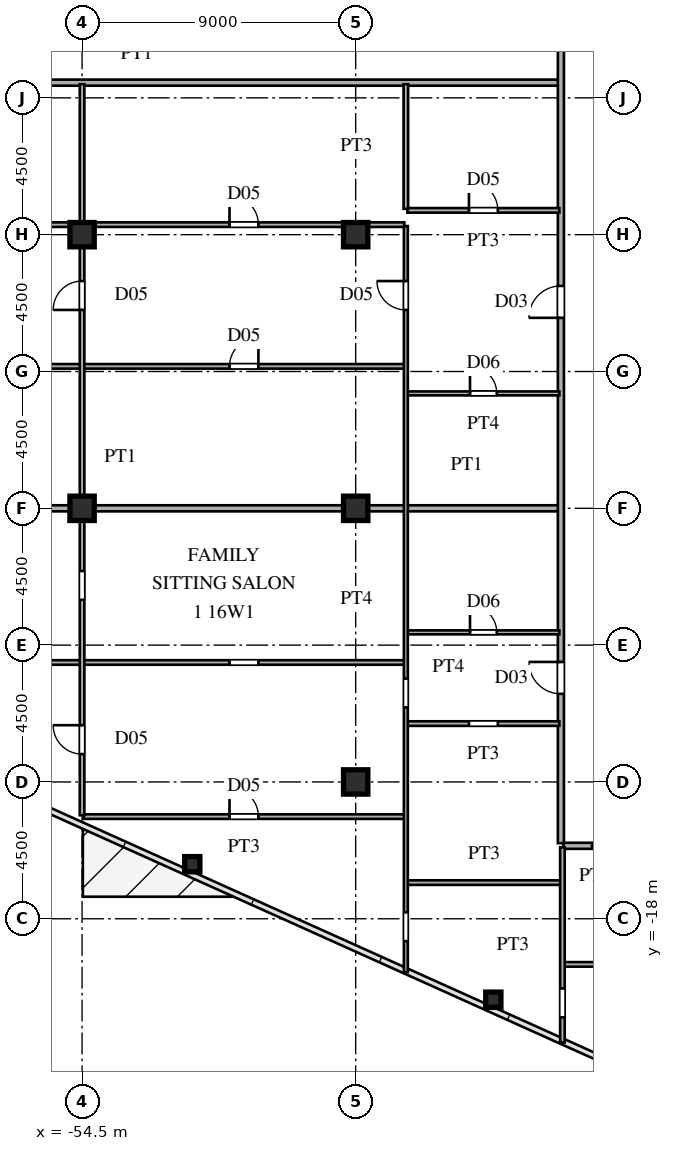
"""IFC4 building model, lengths in metres.
Left out: names, types, materials, properties, quantities, classifications, styles, units other than length and angle.
Written with IfcOpenShell. Run it as: python <this file> out.ifc"""

import sys

from ifc_helpers import new_model, si_unit, direction, frame, frame_2d, origin, origin_2d, place, context, subcontext, project, spatial, rectangle, hollow_rectangle, i_section, extrude, source, transform, mapped, element, fill, save


model = new_model("IFC4")
c1 = context("Model", 3, precision=1e-05, world=origin(), true_north=direction((0.0, 1.0)))
c2 = subcontext(c1, "Body", "Model", "MODEL_VIEW")
j1 = project(units=[si_unit("LENGTHUNIT", "METRE"), si_unit("PLANEANGLEUNIT", "RADIAN")], contexts=[c1])
p1 = place(None, origin())
s1 = spatial("IfcSite", under=j1, at=p1, CompositionType="ELEMENT")
p2 = place(p1, origin())
s2 = spatial("IfcBuilding", under=s1, at=p2, CompositionType="ELEMENT")
p3 = place(p2, frame((0.0, 0.0, 62.1)))
s3 = spatial("IfcBuildingStorey", under=s2, at=p3, CompositionType="ELEMENT", Elevation=62.1)
m1 = source(origin(), c2, "Body", "SweptSolid", [
    extrude(i_section(OverallWidth=0.8, OverallDepth=0.8, WebThickness=0.032, FlangeThickness=0.05, at=origin_2d()), origin(), (0.0, 0.0, 1.0), 3.6),
])
for number, where, z_axis, x_axis in (
    (1, (-45.5, -13.5, 0.0), (0.0, 0.0, 1.0), (1.0, 0.0, 0.0)),
    (2, (-45.5, -4.5, 0.0), (0.0, 0.0, 1.0), (1.0, 0.0, 0.0)),
    (3, (-45.5, 4.5, 0.0), (0.0, 0.0, 1.0), (1.0, 0.0, 0.0)),
    (4, (-54.5, -4.5, 0.0), (0.0, 0.0, 1.0), (1.0, 0.0, 0.0)),
    (5, (-54.5, 4.5, 0.0), (0.0, 0.0, 1.0), (1.0, 0.0, 0.0)),
):
    element("IfcColumn", number, at=place(p3, frame(where, z_axis=z_axis, x_axis=x_axis)), inside=s3, PredefinedType="COLUMN", context=c2, shape_type="MappedRepresentation", body=[
        mapped(m1, transform((0.0, 0.0, 0.0), scale=1.0)),
    ])
m2 = source(origin(), c2, "Body", "SweptSolid", [
    extrude(hollow_rectangle(XDim=0.5, YDim=0.5, WallThickness=0.02, at=origin_2d()), origin(), (0.0, 0.0, 1.0), 3.6),
])
for number, where, z_axis, x_axis in (
    (6, (-40.973, -20.661, 0.0), (0.0, 0.0, 1.0), (1.0, 0.0, 0.0)),
    (7, (-50.875, -16.205, 0.0), (0.0, 0.0, 1.0), (1.0, 0.0, 0.0)),
):
    element("IfcColumn", number, at=place(p3, frame(where, z_axis=z_axis, x_axis=x_axis)), inside=s3, PredefinedType="COLUMN", context=c2, shape_type="MappedRepresentation", body=[
        mapped(m2, transform((0.0, 0.0, 0.0), scale=1.0)),
    ])
p4 = place(p3, frame((-38.65, -19.5, 0.0), z_axis=(0.0, 0.0, 1.0), x_axis=(1.0, 0.0, 0.0)))
e8 = element("IfcWall", 8, at=p4, inside=s3, PredefinedType="PARTITIONING", context=c2, shape_type="SweptSolid", body=[
    extrude(rectangle(XDim=11.185, YDim=0.15, at=frame_2d((5.592, 0.0))), origin(), (0.0, 0.0, 1.0), 3.38),
])
p5 = place(p4, frame((5.075, 0.0, 0.0)))
e9 = element("IfcOpeningElement", 9, at=p5, cuts=e8, PredefinedType="OPENING", context=c2, shape_type="SweptSolid", body=[
    extrude(rectangle(XDim=0.95, YDim=2.15, at=frame_2d((0.475, 1.075))), frame((0.0, 0.085, 0.0), z_axis=(0.0, -1.0, 0.0), x_axis=(1.0, 0.0, 0.0)), (0.0, 0.0, 1.0), 0.17),
])
p6 = place(p3, frame((-43.8, -16.81, 0.0), z_axis=(0.0, 0.0, 1.0), x_axis=(1.0, 0.0, 0.0)))
e10 = element("IfcWall", 10, at=p6, inside=s3, PredefinedType="PARTITIONING", context=c2, shape_type="SweptSolid", body=[
    extrude(rectangle(XDim=5.05, YDim=0.15, at=frame_2d((2.525, 0.0))), origin(), (0.0, 0.0, 1.0), 3.38),
])
p7 = place(p3, frame((-38.665, -15.6, 0.0), z_axis=(0.0, 0.0, 1.0), x_axis=(1.0, 0.0, 0.0)))
e11 = element("IfcWall", 11, at=p7, inside=s3, PredefinedType="PARTITIONING", context=c2, shape_type="SweptSolid", body=[
    extrude(rectangle(XDim=2.08, YDim=0.2, at=frame_2d((1.04, 0.0))), origin(), (0.0, 0.0, 1.0), 3.38),
])
p8 = place(p3, frame((-54.45, -14.64, 0.0), z_axis=(0.0, 0.0, 1.0), x_axis=(1.0, 0.0, 0.0)))
e12 = element("IfcWall", 12, at=p8, inside=s3, PredefinedType="PARTITIONING", context=c2, shape_type="SweptSolid", body=[
    extrude(rectangle(XDim=10.55, YDim=0.15, at=frame_2d((5.275, 0.0))), origin(), (0.0, 0.0, 1.0), 3.38),
])
p9 = place(p8, frame((4.8, 0.0, 0.0)))
e13 = element("IfcOpeningElement", 13, at=p9, cuts=e12, PredefinedType="OPENING", context=c2, shape_type="SweptSolid", body=[
    extrude(rectangle(XDim=0.95, YDim=2.15, at=frame_2d((0.475, 1.075))), frame((0.0, 0.085, 0.0), z_axis=(0.0, -1.0, 0.0), x_axis=(1.0, 0.0, 0.0)), (0.0, 0.0, 1.0), 0.17),
])
p10 = place(p3, frame((-43.8, -11.58, 0.0), z_axis=(0.0, 0.0, 1.0), x_axis=(1.0, 0.0, 0.0)))
e14 = element("IfcWall", 14, at=p10, inside=s3, PredefinedType="PARTITIONING", context=c2, shape_type="SweptSolid", body=[
    extrude(rectangle(XDim=5.0, YDim=0.15, at=frame_2d((2.5, 0.0))), origin(), (0.0, 0.0, 1.0), 3.38),
])
p11 = place(p10, frame((2.025, 0.0, 0.0)))
e15 = element("IfcOpeningElement", 15, at=p11, cuts=e14, PredefinedType="OPENING", context=c2, shape_type="SweptSolid", body=[
    extrude(rectangle(XDim=0.95, YDim=2.15, at=frame_2d((0.475, 1.075))), frame((0.0, 0.085, 0.0), z_axis=(0.0, -1.0, 0.0), x_axis=(1.0, 0.0, 0.0)), (0.0, 0.0, 1.0), 0.17),
])
p12 = place(p3, frame((-66.429, -9.57, 0.0), z_axis=(0.0, 0.0, 1.0), x_axis=(1.0, 0.0, 0.0)))
e16 = element("IfcWall", 16, at=p12, inside=s3, PredefinedType="PARTITIONING", context=c2, shape_type="SweptSolid", body=[
    extrude(rectangle(XDim=22.529, YDim=0.15, at=frame_2d((11.265, 0.0))), origin(), (0.0, 0.0, 1.0), 3.38),
])
p13 = place(p12, frame((16.779, 0.0, 0.0)))
e17 = element("IfcOpeningElement", 17, at=p13, cuts=e16, PredefinedType="OPENING", context=c2, shape_type="SweptSolid", body=[
    extrude(rectangle(XDim=0.95, YDim=2.15, at=frame_2d((0.475, 1.075))), frame((0.0, 0.085, 0.0), z_axis=(0.0, -1.0, 0.0), x_axis=(1.0, 0.0, 0.0)), (0.0, 0.0, 1.0), 0.17),
])
p14 = place(p3, frame((-43.8, -8.58, 0.0), z_axis=(0.0, 0.0, 1.0), x_axis=(1.0, 0.0, 0.0)))
e18 = element("IfcWall", 18, at=p14, inside=s3, PredefinedType="PARTITIONING", context=c2, shape_type="SweptSolid", body=[
    extrude(rectangle(XDim=5.0, YDim=0.13, at=frame_2d((2.5, 0.0))), origin(), (0.0, 0.0, 1.0), 3.38),
])
p15 = place(p14, frame((2.06, 0.0, 0.0)))
e19 = element("IfcOpeningElement", 19, at=p15, cuts=e18, PredefinedType="OPENING", context=c2, shape_type="SweptSolid", body=[
    extrude(rectangle(XDim=0.88, YDim=2.1, at=frame_2d((0.44, 1.05))), frame((0.0, 0.075, 0.0), z_axis=(0.0, -1.0, 0.0), x_axis=(1.0, 0.0, 0.0)), (0.0, 0.0, 1.0), 0.15),
])
p16 = place(p3, frame((-71.005, -4.5, 0.0), z_axis=(0.0, 0.0, 1.0), x_axis=(1.0, 0.0, 0.0)))
e20 = element("IfcWall", 20, at=p16, inside=s3, PredefinedType="PARTITIONING", context=c2, shape_type="SweptSolid", body=[
    extrude(rectangle(XDim=16.485, YDim=0.2, at=frame_2d((8.242, 0.0))), origin(), (0.0, 0.0, 1.0), 3.38),
])
p17 = place(p3, frame((-54.52, -4.5, 0.0), z_axis=(0.0, 0.0, 1.0), x_axis=(1.0, 0.0, 0.0)))
e21 = element("IfcWall", 21, at=p17, inside=s3, PredefinedType="PARTITIONING", context=c2, shape_type="SweptSolid", body=[
    extrude(rectangle(XDim=15.69, YDim=0.2, at=frame_2d((7.845, 0.0))), origin(), (0.0, 0.0, 1.0), 2.68),
])
p18 = place(p3, frame((-43.8, -0.72, 0.0), z_axis=(0.0, 0.0, 1.0), x_axis=(1.0, 0.0, 0.0)))
e22 = element("IfcWall", 22, at=p18, inside=s3, PredefinedType="PARTITIONING", context=c2, shape_type="SweptSolid", body=[
    extrude(rectangle(XDim=5.0, YDim=0.13, at=frame_2d((2.5, 0.0))), origin(), (0.0, 0.0, 1.0), 3.38),
])
p19 = place(p18, frame((2.06, 0.0, 0.0)))
e23 = element("IfcOpeningElement", 23, at=p19, cuts=e22, PredefinedType="OPENING", context=c2, shape_type="SweptSolid", body=[
    extrude(rectangle(XDim=0.88, YDim=2.1, at=frame_2d((0.44, 1.05))), frame((0.0, 0.075, 0.0), z_axis=(0.0, -1.0, 0.0), x_axis=(1.0, 0.0, 0.0)), (0.0, 0.0, 1.0), 0.15),
])
p20 = place(p3, frame((-71.035, 0.17, 0.0), z_axis=(0.0, 0.0, 1.0), x_axis=(1.0, 0.0, 0.0)))
e24 = element("IfcWall", 24, at=p20, inside=s3, PredefinedType="PARTITIONING", context=c2, shape_type="SweptSolid", body=[
    extrude(rectangle(XDim=27.135, YDim=0.15, at=frame_2d((13.567, 0.0))), origin(), (0.0, 0.0, 1.0), 3.38),
])
p21 = place(p20, frame((21.385, 0.0, 0.0)))
e25 = element("IfcOpeningElement", 25, at=p21, cuts=e24, PredefinedType="OPENING", context=c2, shape_type="SweptSolid", body=[
    extrude(rectangle(XDim=0.95, YDim=2.15, at=frame_2d((0.475, 1.075))), frame((0.0, 0.085, 0.0), z_axis=(0.0, -1.0, 0.0), x_axis=(1.0, 0.0, 0.0)), (0.0, 0.0, 1.0), 0.17),
])
p22 = place(p20, frame((13.21, 0.0, 0.0)))
e26 = element("IfcOpeningElement", 26, at=p22, cuts=e24, PredefinedType="OPENING", context=c2, shape_type="SweptSolid", body=[
    extrude(rectangle(XDim=0.95, YDim=2.15, at=frame_2d((0.475, 1.075))), frame((0.0, 0.085, 0.0), z_axis=(0.0, -1.0, 0.0), x_axis=(1.0, 0.0, 0.0)), (0.0, 0.0, 1.0), 0.17),
])
p23 = place(p3, frame((-71.035, 4.83, 0.0), z_axis=(0.0, 0.0, 1.0), x_axis=(1.0, 0.0, 0.0)))
e27 = element("IfcWall", 27, at=p23, inside=s3, PredefinedType="PARTITIONING", context=c2, shape_type="SweptSolid", body=[
    extrude(rectangle(XDim=27.135, YDim=0.15, at=frame_2d((13.567, 0.0))), origin(), (0.0, 0.0, 1.0), 3.38),
])
p24 = place(p23, frame((21.385, 0.0, 0.0)))
e28 = element("IfcOpeningElement", 28, at=p24, cuts=e27, PredefinedType="OPENING", context=c2, shape_type="SweptSolid", body=[
    extrude(rectangle(XDim=0.95, YDim=2.15, at=frame_2d((0.475, 1.075))), frame((0.0, 0.085, 0.0), z_axis=(0.0, -1.0, 0.0), x_axis=(1.0, 0.0, 0.0)), (0.0, 0.0, 1.0), 0.17),
])
p25 = place(p23, frame((13.21, 0.0, 0.0)))
e29 = element("IfcOpeningElement", 29, at=p25, cuts=e27, PredefinedType="OPENING", context=c2, shape_type="SweptSolid", body=[
    extrude(rectangle(XDim=0.95, YDim=2.15, at=frame_2d((0.475, 1.075))), frame((0.0, 0.085, 0.0), z_axis=(0.0, -1.0, 0.0), x_axis=(1.0, 0.0, 0.0)), (0.0, 0.0, 1.0), 0.17),
])
p26 = place(p3, frame((-43.8, 5.3, 0.0), z_axis=(0.0, 0.0, 1.0), x_axis=(1.0, 0.0, 0.0)))
e30 = element("IfcWall", 30, at=p26, inside=s3, PredefinedType="PARTITIONING", context=c2, shape_type="SweptSolid", body=[
    extrude(rectangle(XDim=5.0, YDim=0.15, at=frame_2d((2.5, 0.0))), origin(), (0.0, 0.0, 1.0), 3.38),
])
p27 = place(p26, frame((2.025, 0.0, 0.0)))
e31 = element("IfcOpeningElement", 31, at=p27, cuts=e30, PredefinedType="OPENING", context=c2, shape_type="SweptSolid", body=[
    extrude(rectangle(XDim=0.95, YDim=2.15, at=frame_2d((0.475, 1.075))), frame((0.0, 0.085, 0.0), z_axis=(0.0, -1.0, 0.0), x_axis=(1.0, 0.0, 0.0)), (0.0, 0.0, 1.0), 0.17),
])
p28 = place(p3, frame((-66.568, 9.5, 0.0), z_axis=(0.0, 0.0, 1.0), x_axis=(1.0, 0.0, 0.0)))
e32 = element("IfcWall", 32, at=p28, inside=s3, PredefinedType="PARTITIONING", context=c2, shape_type="SweptSolid", body=[
    extrude(rectangle(XDim=27.738, YDim=0.2, at=frame_2d((13.869, 0.0))), origin(), (0.0, 0.0, 1.0), 3.38),
])
p29 = place(p3, frame((-54.5, -14.595, 0.0), z_axis=(0.0, 0.0, 1.0), x_axis=(0.0, 1.0, 0.0)))
e33 = element("IfcWall", 33, at=p29, inside=s3, PredefinedType="PARTITIONING", context=c2, shape_type="SweptSolid", body=[
    extrude(rectangle(XDim=24.045, YDim=0.15, at=frame_2d((12.022, 0.0))), origin(), (0.0, 0.0, 1.0), 2.68),
])
p30 = place(p29, frame((2.011, 0.0, 0.0)))
e34 = element("IfcOpeningElement", 34, at=p30, cuts=e33, PredefinedType="OPENING", context=c2, shape_type="SweptSolid", body=[
    extrude(rectangle(XDim=0.95, YDim=2.15, at=frame_2d((0.475, 1.075))), frame((0.0, 0.085, 0.0), z_axis=(0.0, -1.0, 0.0), x_axis=(1.0, 0.0, 0.0)), (0.0, 0.0, 1.0), 0.17),
])
p31 = place(p29, frame((7.084, 0.0, 0.0)))
e35 = element("IfcOpeningElement", 35, at=p31, cuts=e33, PredefinedType="OPENING", context=c2, shape_type="SweptSolid", body=[
    extrude(rectangle(XDim=0.95, YDim=2.15, at=frame_2d((0.475, 1.075))), frame((0.0, 0.085, 0.0), z_axis=(0.0, -1.0, 0.0), x_axis=(1.0, 0.0, 0.0)), (0.0, 0.0, 1.0), 0.17),
])
p32 = place(p29, frame((16.62, 0.0, 0.0)))
e36 = element("IfcOpeningElement", 36, at=p32, cuts=e33, PredefinedType="OPENING", context=c2, shape_type="SweptSolid", body=[
    extrude(rectangle(XDim=0.95, YDim=2.15, at=frame_2d((0.475, 1.075))), frame((0.0, 0.085, 0.0), z_axis=(0.0, -1.0, 0.0), x_axis=(1.0, 0.0, 0.0)), (0.0, 0.0, 1.0), 0.17),
])
p33 = place(p3, frame((-43.85, -19.753, 0.0), z_axis=(0.0, 0.0, 1.0), x_axis=(0.0, 1.0, 0.0)))
e37 = element("IfcWall", 37, at=p33, inside=s3, PredefinedType="PARTITIONING", context=c2, shape_type="SweptSolid", body=[
    extrude(rectangle(XDim=24.536, YDim=0.13, at=frame_2d((12.268, 0.0))), origin(), (0.0, 0.0, 1.0), 3.38),
])
p34 = place(p33, frame((8.703, 0.0, 0.0)))
e38 = element("IfcOpeningElement", 38, at=p34, cuts=e37, PredefinedType="OPENING", context=c2, shape_type="SweptSolid", body=[
    extrude(rectangle(XDim=0.95, YDim=2.15, at=frame_2d((0.475, 1.075))), frame((0.0, 0.075, 0.0), z_axis=(0.0, -1.0, 0.0), x_axis=(1.0, 0.0, 0.0)), (0.0, 0.0, 1.0), 0.15),
])
p35 = place(p33, frame((1.016, 0.0, 0.0)))
e39 = element("IfcOpeningElement", 39, at=p35, cuts=e37, PredefinedType="OPENING", context=c2, shape_type="SweptSolid", body=[
    extrude(rectangle(XDim=0.95, YDim=2.15, at=frame_2d((0.475, 1.075))), frame((0.0, 0.075, 0.0), z_axis=(0.0, -1.0, 0.0), x_axis=(1.0, 0.0, 0.0)), (0.0, 0.0, 1.0), 0.15),
])
p36 = place(p33, frame((21.778, 0.0, 0.0)))
e40 = element("IfcOpeningElement", 40, at=p36, cuts=e37, PredefinedType="OPENING", context=c2, shape_type="SweptSolid", body=[
    extrude(rectangle(XDim=0.95, YDim=2.15, at=frame_2d((0.475, 1.075))), frame((0.0, 0.075, 0.0), z_axis=(0.0, -1.0, 0.0), x_axis=(1.0, 0.0, 0.0)), (0.0, 0.0, 1.0), 0.15),
])
p37 = place(p3, frame((-43.85, 5.352, 0.0), z_axis=(0.0, 0.0, 1.0), x_axis=(0.0, 1.0, 0.0)))
e41 = element("IfcWall", 41, at=p37, inside=s3, PredefinedType="PARTITIONING", context=c2, shape_type="SweptSolid", body=[
    extrude(rectangle(XDim=4.098, YDim=0.15, at=frame_2d((2.049, 0.0))), origin(), (0.0, 0.0, 1.0), 3.38),
])
p38 = place(p3, frame((-38.75, -15.515, 0.0), z_axis=(0.0, 0.0, 1.0), x_axis=(0.0, 1.0, 0.0)))
e42 = element("IfcWall", 42, at=p38, inside=s3, PredefinedType="PARTITIONING", context=c2, shape_type="SweptSolid", body=[
    extrude(rectangle(XDim=31.03, YDim=0.2, at=frame_2d((15.515, 0.0))), origin(), (0.0, 0.0, 1.0), 3.38),
])
p39 = place(p38, frame((4.913, 0.0, 0.0)))
e43 = element("IfcOpeningElement", 43, at=p39, cuts=e42, PredefinedType="OPENING", context=c2, shape_type="SweptSolid", body=[
    extrude(rectangle(XDim=1.05, YDim=2.25, at=frame_2d((0.525, 1.125))), frame((0.0, 0.11, 0.0), z_axis=(0.0, -1.0, 0.0), x_axis=(1.0, 0.0, 0.0)), (0.0, 0.0, 1.0), 0.22),
])
p40 = place(p38, frame((17.28, 0.0, 0.0)))
e44 = element("IfcOpeningElement", 44, at=p40, cuts=e42, PredefinedType="OPENING", context=c2, shape_type="SweptSolid", body=[
    extrude(rectangle(XDim=1.05, YDim=2.25, at=frame_2d((0.525, 1.125))), frame((0.0, 0.11, 0.0), z_axis=(0.0, -1.0, 0.0), x_axis=(1.0, 0.0, 0.0)), (0.0, 0.0, 1.0), 0.22),
])
p41 = place(p38, frame((27.54, 0.0, 0.0)))
e45 = element("IfcOpeningElement", 45, at=p41, cuts=e42, PredefinedType="OPENING", context=c2, shape_type="SweptSolid", body=[
    extrude(rectangle(XDim=1.05, YDim=2.25, at=frame_2d((0.525, 1.125))), frame((0.0, 0.11, 0.0), z_axis=(0.0, -1.0, 0.0), x_axis=(1.0, 0.0, 0.0)), (0.0, 0.0, 1.0), 0.22),
])
p42 = place(p3, frame((-38.7, -22.07, 0.0), z_axis=(0.0, 0.0, 1.0), x_axis=(0.0, 1.0, 0.0)))
e46 = element("IfcWall", 46, at=p42, inside=s3, PredefinedType="PARTITIONING", context=c2, shape_type="SweptSolid", body=[
    extrude(rectangle(XDim=6.42, YDim=0.15, at=frame_2d((3.21, 0.0))), origin(), (0.0, 0.0, 1.0), 3.38),
])
p43 = place(p42, frame((0.827, 0.0, 0.0)))
e47 = element("IfcOpeningElement", 47, at=p43, cuts=e46, PredefinedType="OPENING", context=c2, shape_type="SweptSolid", body=[
    extrude(rectangle(XDim=0.95, YDim=2.15, at=frame_2d((0.475, 1.075))), frame((0.0, 0.085, 0.0), z_axis=(0.0, -1.0, 0.0), x_axis=(1.0, 0.0, 0.0)), (0.0, 0.0, 1.0), 0.17),
])
m3 = source(origin(), c2, "Body", "SweptSolid", [
    extrude(rectangle(XDim=0.95, YDim=2.15, at=frame_2d((0.475, 1.075))), frame((0.0, 0.025, 0.0), z_axis=(0.0, -1.0, 0.0), x_axis=(1.0, 0.0, 0.0)), (0.0, 0.0, 1.0), 0.05),
])
p44 = place(p9, origin())
e48 = element("IfcDoor", 48, at=p44, inside=s3, OperationType="SINGLE_SWING_LEFT", PredefinedType="DOOR", context=c2, shape_type="MappedRepresentation", body=[
    mapped(m3, transform((0.0, 0.0, 0.0), scale=1.0)),
])
fill(e13, e48)
m4 = source(origin(), c2, "Body", "SweptSolid", [
    extrude(rectangle(XDim=0.88, YDim=2.1, at=frame_2d((0.44, 1.05))), frame((0.0, 0.025, 0.0), z_axis=(0.0, -1.0, 0.0), x_axis=(1.0, 0.0, 0.0)), (0.0, 0.0, 1.0), 0.05),
])
p45 = place(p15, origin())
e49 = element("IfcDoor", 49, at=p45, inside=s3, OperationType="SINGLE_SWING_LEFT", PredefinedType="DOOR", context=c2, shape_type="MappedRepresentation", body=[
    mapped(m4, transform((0.0, 0.0, 0.0), scale=1.0)),
])
fill(e19, e49)
p46 = place(p19, origin())
e50 = element("IfcDoor", 50, at=p46, inside=s3, OperationType="SINGLE_SWING_LEFT", PredefinedType="DOOR", context=c2, shape_type="MappedRepresentation", body=[
    mapped(m4, transform((0.0, 0.0, 0.0), scale=1.0)),
])
fill(e23, e50)
p47 = place(p21, origin())
e51 = element("IfcDoor", 51, at=p47, inside=s3, OperationType="SINGLE_SWING_RIGHT", PredefinedType="DOOR", context=c2, shape_type="MappedRepresentation", body=[
    mapped(m3, transform((0.0, 0.0, 0.0), scale=1.0)),
])
fill(e25, e51)
p48 = place(p24, origin())
e52 = element("IfcDoor", 52, at=p48, inside=s3, OperationType="SINGLE_SWING_LEFT", PredefinedType="DOOR", context=c2, shape_type="MappedRepresentation", body=[
    mapped(m3, transform((0.0, 0.0, 0.0), scale=1.0)),
])
fill(e28, e52)
p49 = place(p27, origin())
e53 = element("IfcDoor", 53, at=p49, inside=s3, OperationType="SINGLE_SWING_LEFT", PredefinedType="DOOR", context=c2, shape_type="MappedRepresentation", body=[
    mapped(m3, transform((0.0, 0.0, 0.0), scale=1.0)),
])
fill(e31, e53)
p50 = place(p30, origin())
e54 = element("IfcDoor", 54, at=p50, inside=s3, OperationType="SINGLE_SWING_RIGHT", PredefinedType="DOOR", context=c2, shape_type="MappedRepresentation", body=[
    mapped(m3, transform((0.0, 0.0, 0.0), scale=1.0)),
])
fill(e34, e54)
p51 = place(p32, origin())
e55 = element("IfcDoor", 55, at=p51, inside=s3, OperationType="SINGLE_SWING_LEFT", PredefinedType="DOOR", context=c2, shape_type="MappedRepresentation", body=[
    mapped(m3, transform((0.0, 0.0, 0.0), scale=1.0)),
])
fill(e36, e55)
p52 = place(p36, origin())
e56 = element("IfcDoor", 56, at=p52, inside=s3, OperationType="SINGLE_SWING_RIGHT", PredefinedType="DOOR", context=c2, shape_type="MappedRepresentation", body=[
    mapped(m3, transform((0.0, 0.0, 0.0), scale=1.0)),
])
fill(e40, e56)
m5 = source(origin(), c2, "Body", "SweptSolid", [
    extrude(rectangle(XDim=1.05, YDim=2.25, at=frame_2d((0.525, 1.125))), frame((0.0, 0.025, 0.0), z_axis=(0.0, -1.0, 0.0), x_axis=(1.0, 0.0, 0.0)), (0.0, 0.0, 1.0), 0.05),
])
p53 = place(p39, origin())
e57 = element("IfcDoor", 57, at=p53, inside=s3, OperationType="SINGLE_SWING_RIGHT", PredefinedType="DOOR", context=c2, shape_type="MappedRepresentation", body=[
    mapped(m5, transform((0.0, 0.0, 0.0), scale=1.0)),
])
fill(e43, e57)
p54 = place(p40, origin())
e58 = element("IfcDoor", 58, at=p54, inside=s3, OperationType="SINGLE_SWING_LEFT", PredefinedType="DOOR", context=c2, shape_type="MappedRepresentation", body=[
    mapped(m5, transform((0.0, 0.0, 0.0), scale=1.0)),
])
fill(e44, e58)
save(model, sys.argv[1])
